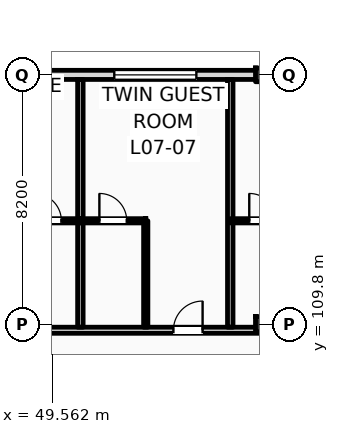
"""IFC4 building model, lengths in metres.
Left out: names, types, materials, properties, quantities, classifications, styles, units other than length and angle.
Written with IfcOpenShell. Run it as: python <this file> out.ifc"""

import sys

from ifc_helpers import new_model, si_unit, direction, frame, frame_2d, origin, origin_2d, place, context, subcontext, project, spatial, rectangle, i_section, extrude, element, fill, save


model = new_model("IFC4")
c1 = context("Model", 3, precision=1e-05, world=origin(), true_north=direction((0.0, 1.0)))
c2 = subcontext(c1, "Body", "Model", "MODEL_VIEW")
j1 = project(units=[si_unit("LENGTHUNIT", "METRE"), si_unit("PLANEANGLEUNIT", "RADIAN")], contexts=[c1])
p1 = place(None, origin())
s1 = spatial("IfcSite", under=j1, at=p1, CompositionType="ELEMENT")
p2 = place(p1, origin())
s2 = spatial("IfcBuilding", under=s1, at=p2, CompositionType="ELEMENT")
p3 = place(p2, frame((0.0, 0.0, 31.8)))
s3 = spatial("IfcBuildingStorey", under=s2, at=p3, CompositionType="ELEMENT", Elevation=31.8)
p4 = place(p3, frame((56.4, 109.8, 0.0), z_axis=(0.0, 0.0, 1.0), x_axis=(1.0, 0.0, 0.0)))
e1 = element("IfcColumn", 1, at=p4, inside=s3, PredefinedType="COLUMN", context=c2, shape_type="SweptSolid", body=[
    extrude(i_section(OverallWidth=0.3, OverallDepth=0.5, WebThickness=0.014, FlangeThickness=0.028, FilletRadius=0.027, at=origin_2d()), origin(), (0.0, 0.0, 1.0), 3.6),
])
p5 = place(p3, frame((56.4, 118.0, 0.0), z_axis=(0.0, 0.0, 1.0), x_axis=(1.0, 0.0, 0.0)))
e2 = element("IfcColumn", 2, at=p5, inside=s3, PredefinedType="COLUMN", context=c2, shape_type="SweptSolid", body=[
    extrude(i_section(OverallWidth=0.3, OverallDepth=0.45, WebThickness=0.014, FlangeThickness=0.026, FilletRadius=0.027, at=origin_2d()), origin(), (0.0, 0.0, 1.0), 3.6),
])
p6 = place(p3, frame((22.5, 118.0, 0.0), z_axis=(0.0, 0.0, 1.0), x_axis=(1.0, 0.0, 0.0)))
e3 = element("IfcWall", 3, at=p6, inside=s3, PredefinedType="STANDARD", context=c2, shape_type="SweptSolid", body=[
    extrude(rectangle(XDim=97.5, YDim=0.3, at=frame_2d((48.75, 0.0))), origin(), (0.0, 0.0, 1.0), 2.72),
])
p7 = place(p6, frame((3.61, 0.0, 0.9)))
e4 = element("IfcOpeningElement", 4, at=p7, cuts=e3, PredefinedType="OPENING", context=c2, shape_type="SweptSolid", body=[
    extrude(rectangle(XDim=1.1, YDim=1.64, at=frame_2d((0.55, 0.82))), frame((0.0, 0.16, 0.0), z_axis=(0.0, -1.0, 0.0), x_axis=(1.0, 0.0, 0.0)), (0.0, 0.0, 1.0), 0.32),
])
p8 = place(p6, frame((6.855, 0.0, 0.0)))
e5 = element("IfcOpeningElement", 5, at=p8, cuts=e3, PredefinedType="OPENING", context=c2, shape_type="SweptSolid", body=[
    extrude(rectangle(XDim=1.2, YDim=2.25, at=frame_2d((0.6, 1.125))), frame((0.0, 0.16, 0.0), z_axis=(0.0, -1.0, 0.0), x_axis=(1.0, 0.0, 0.0)), (0.0, 0.0, 1.0), 0.32),
])
p9 = place(p6, frame((11.405, 0.0, 0.9)))
e6 = element("IfcOpeningElement", 6, at=p9, cuts=e3, PredefinedType="OPENING", context=c2, shape_type="SweptSolid", body=[
    extrude(rectangle(XDim=2.1, YDim=1.64, at=frame_2d((1.05, 0.82))), frame((0.0, 0.16, 0.0), z_axis=(0.0, -1.0, 0.0), x_axis=(1.0, 0.0, 0.0)), (0.0, 0.0, 1.0), 0.32),
])
p10 = place(p6, frame((15.13, 0.0, 0.9)))
e7 = element("IfcOpeningElement", 7, at=p10, cuts=e3, PredefinedType="OPENING", context=c2, shape_type="SweptSolid", body=[
    extrude(rectangle(XDim=2.25, YDim=1.64, at=frame_2d((1.125, 0.82))), frame((0.0, 0.16, 0.0), z_axis=(0.0, -1.0, 0.0), x_axis=(1.0, 0.0, 0.0)), (0.0, 0.0, 1.0), 0.32),
])
p11 = place(p6, frame((21.53, 0.0, 0.0)))
e8 = element("IfcOpeningElement", 8, at=p11, cuts=e3, PredefinedType="OPENING", context=c2, shape_type="SweptSolid", body=[
    extrude(rectangle(XDim=1.2, YDim=2.25, at=frame_2d((0.6, 1.125))), frame((0.0, 0.16, 0.0), z_axis=(0.0, -1.0, 0.0), x_axis=(1.0, 0.0, 0.0)), (0.0, 0.0, 1.0), 0.32),
])
p12 = place(p6, frame((24.18, 0.0, 0.9)))
e9 = element("IfcOpeningElement", 9, at=p12, cuts=e3, PredefinedType="OPENING", context=c2, shape_type="SweptSolid", body=[
    extrude(rectangle(XDim=1.1, YDim=1.64, at=frame_2d((0.55, 0.82))), frame((0.0, 0.16, 0.0), z_axis=(0.0, -1.0, 0.0), x_axis=(1.0, 0.0, 0.0)), (0.0, 0.0, 1.0), 0.32),
])
p13 = place(p6, frame((29.105, 0.0, 0.9)))
e10 = element("IfcOpeningElement", 10, at=p13, cuts=e3, PredefinedType="OPENING", context=c2, shape_type="SweptSolid", body=[
    extrude(rectangle(XDim=2.7, YDim=1.64, at=frame_2d((1.35, 0.82))), frame((0.0, 0.16, 0.0), z_axis=(0.0, -1.0, 0.0), x_axis=(1.0, 0.0, 0.0)), (0.0, 0.0, 1.0), 0.32),
])
p14 = place(p6, frame((34.83, 0.0, 0.9)))
e11 = element("IfcOpeningElement", 11, at=p14, cuts=e3, PredefinedType="OPENING", context=c2, shape_type="SweptSolid", body=[
    extrude(rectangle(XDim=1.8, YDim=1.64, at=frame_2d((0.9, 0.82))), frame((0.0, 0.16, 0.0), z_axis=(0.0, -1.0, 0.0), x_axis=(1.0, 0.0, 0.0)), (0.0, 0.0, 1.0), 0.32),
])
p15 = place(p6, frame((38.525, 0.0, 0.0)))
e12 = element("IfcOpeningElement", 12, at=p15, cuts=e3, PredefinedType="OPENING", context=c2, shape_type="SweptSolid", body=[
    extrude(rectangle(XDim=1.2, YDim=2.25, at=frame_2d((0.6, 1.125))), frame((0.0, 0.16, 0.0), z_axis=(0.0, -1.0, 0.0), x_axis=(1.0, 0.0, 0.0)), (0.0, 0.0, 1.0), 0.32),
])
p16 = place(p6, frame((42.73, 0.0, 0.9)))
e13 = element("IfcOpeningElement", 13, at=p16, cuts=e3, PredefinedType="OPENING", context=c2, shape_type="SweptSolid", body=[
    extrude(rectangle(XDim=3.05, YDim=1.64, at=frame_2d((1.525, 0.82))), frame((0.0, 0.16, 0.0), z_axis=(0.0, -1.0, 0.0), x_axis=(1.0, 0.0, 0.0)), (0.0, 0.0, 1.0), 0.32),
])
p17 = place(p6, frame((47.155, 0.0, 0.9)))
e14 = element("IfcOpeningElement", 14, at=p17, cuts=e3, PredefinedType="OPENING", context=c2, shape_type="SweptSolid", body=[
    extrude(rectangle(XDim=1.35, YDim=1.64, at=frame_2d((0.675, 0.82))), frame((0.0, 0.16, 0.0), z_axis=(0.0, -1.0, 0.0), x_axis=(1.0, 0.0, 0.0)), (0.0, 0.0, 1.0), 0.32),
])
p18 = place(p6, frame((53.065, 0.0, 0.0)))
e15 = element("IfcOpeningElement", 15, at=p18, cuts=e3, PredefinedType="OPENING", context=c2, shape_type="SweptSolid", body=[
    extrude(rectangle(XDim=1.2, YDim=2.25, at=frame_2d((0.6, 1.125))), frame((0.0, 0.16, 0.0), z_axis=(0.0, -1.0, 0.0), x_axis=(1.0, 0.0, 0.0)), (0.0, 0.0, 1.0), 0.32),
])
p19 = place(p6, frame((58.2, 0.0, 0.9)))
e16 = element("IfcOpeningElement", 16, at=p19, cuts=e3, PredefinedType="OPENING", context=c2, shape_type="SweptSolid", body=[
    extrude(rectangle(XDim=1.8, YDim=1.64, at=frame_2d((0.9, 0.82))), frame((0.0, 0.16, 0.0), z_axis=(0.0, -1.0, 0.0), x_axis=(1.0, 0.0, 0.0)), (0.0, 0.0, 1.0), 0.32),
])
p20 = place(p6, frame((61.13, 0.0, 0.9)))
e17 = element("IfcOpeningElement", 17, at=p20, cuts=e3, PredefinedType="OPENING", context=c2, shape_type="SweptSolid", body=[
    extrude(rectangle(XDim=3.05, YDim=1.64, at=frame_2d((1.525, 0.82))), frame((0.0, 0.16, 0.0), z_axis=(0.0, -1.0, 0.0), x_axis=(1.0, 0.0, 0.0)), (0.0, 0.0, 1.0), 0.32),
])
p21 = place(p6, frame((67.93, 0.0, 0.0)))
e18 = element("IfcOpeningElement", 18, at=p21, cuts=e3, PredefinedType="OPENING", context=c2, shape_type="SweptSolid", body=[
    extrude(rectangle(XDim=1.2, YDim=2.25, at=frame_2d((0.6, 1.125))), frame((0.0, 0.16, 0.0), z_axis=(0.0, -1.0, 0.0), x_axis=(1.0, 0.0, 0.0)), (0.0, 0.0, 1.0), 0.32),
])
p22 = place(p6, frame((70.39, 0.0, 0.0)))
e19 = element("IfcOpeningElement", 19, at=p22, cuts=e3, PredefinedType="OPENING", context=c2, shape_type="SweptSolid", body=[
    extrude(rectangle(XDim=1.2, YDim=2.25, at=frame_2d((0.6, 1.125))), frame((0.0, 0.16, 0.0), z_axis=(0.0, -1.0, 0.0), x_axis=(1.0, 0.0, 0.0)), (0.0, 0.0, 1.0), 0.32),
])
p23 = place(p6, frame((75.905, 0.0, 0.9)))
e20 = element("IfcOpeningElement", 20, at=p23, cuts=e3, PredefinedType="OPENING", context=c2, shape_type="SweptSolid", body=[
    extrude(rectangle(XDim=1.1, YDim=1.5, at=frame_2d((0.55, 0.75))), frame((0.0, 0.16, 0.0), z_axis=(0.0, -1.0, 0.0), x_axis=(1.0, 0.0, 0.0)), (0.0, 0.0, 1.0), 0.32),
])
p24 = place(p6, frame((81.63, 0.0, 0.9)))
e21 = element("IfcOpeningElement", 21, at=p24, cuts=e3, PredefinedType="OPENING", context=c2, shape_type="SweptSolid", body=[
    extrude(rectangle(XDim=1.1, YDim=1.6, at=frame_2d((0.55, 0.8))), frame((0.0, 0.16, 0.0), z_axis=(0.0, -1.0, 0.0), x_axis=(1.0, 0.0, 0.0)), (0.0, 0.0, 1.0), 0.32),
])
p25 = place(p6, frame((84.955, 0.0, 0.9)))
e22 = element("IfcOpeningElement", 22, at=p25, cuts=e3, PredefinedType="OPENING", context=c2, shape_type="SweptSolid", body=[
    extrude(rectangle(XDim=1.4, YDim=1.64, at=frame_2d((0.7, 0.82))), frame((0.0, 0.16, 0.0), z_axis=(0.0, -1.0, 0.0), x_axis=(1.0, 0.0, 0.0)), (0.0, 0.0, 1.0), 0.32),
])
p26 = place(p6, frame((90.055, 0.0, 0.9)))
e23 = element("IfcOpeningElement", 23, at=p26, cuts=e3, PredefinedType="OPENING", context=c2, shape_type="SweptSolid", body=[
    extrude(rectangle(XDim=1.6, YDim=1.64, at=frame_2d((0.8, 0.82))), frame((0.0, 0.16, 0.0), z_axis=(0.0, -1.0, 0.0), x_axis=(1.0, 0.0, 0.0)), (0.0, 0.0, 1.0), 0.32),
])
p27 = place(p6, frame((93.87, 0.0, 0.9)))
e24 = element("IfcOpeningElement", 24, at=p27, cuts=e3, PredefinedType="OPENING", context=c2, shape_type="SweptSolid", body=[
    extrude(rectangle(XDim=1.75, YDim=1.64, at=frame_2d((0.875, 0.82))), frame((0.0, 0.16, 0.0), z_axis=(0.0, -1.0, 0.0), x_axis=(1.0, 0.0, 0.0)), (0.0, 0.0, 1.0), 0.32),
])
p28 = place(p3, frame((10.65, 109.6, 0.0), z_axis=(0.0, 0.0, 1.0), x_axis=(1.0, 0.0, 0.0)))
e25 = element("IfcWall", 25, at=p28, inside=s3, PredefinedType="PARTITIONING", context=c2, shape_type="SweptSolid", body=[
    extrude(rectangle(XDim=109.21, YDim=0.2, at=frame_2d((54.605, 0.0))), origin(), (0.0, 0.0, 1.0), 2.72),
])
p29 = place(p28, frame((15.825, 0.0, 0.0)))
e26 = element("IfcOpeningElement", 26, at=p29, cuts=e25, PredefinedType="OPENING", context=c2, shape_type="SweptSolid", body=[
    extrude(rectangle(XDim=1.02, YDim=2.2, at=frame_2d((0.51, 1.1))), frame((0.0, 0.11, 0.0), z_axis=(0.0, -1.0, 0.0), x_axis=(1.0, 0.0, 0.0)), (0.0, 0.0, 1.0), 0.22),
])
p30 = place(p28, frame((19.87, 0.0, 0.0)))
e27 = element("IfcOpeningElement", 27, at=p30, cuts=e25, PredefinedType="OPENING", context=c2, shape_type="SweptSolid", body=[
    extrude(rectangle(XDim=1.02, YDim=2.2, at=frame_2d((0.51, 1.1))), frame((0.0, 0.11, 0.0), z_axis=(0.0, -1.0, 0.0), x_axis=(1.0, 0.0, 0.0)), (0.0, 0.0, 1.0), 0.22),
])
p31 = place(p28, frame((24.47, 0.0, 0.0)))
e28 = element("IfcOpeningElement", 28, at=p31, cuts=e25, PredefinedType="OPENING", context=c2, shape_type="SweptSolid", body=[
    extrude(rectangle(XDim=1.02, YDim=2.2, at=frame_2d((0.51, 1.1))), frame((0.0, 0.11, 0.0), z_axis=(0.0, -1.0, 0.0), x_axis=(1.0, 0.0, 0.0)), (0.0, 0.0, 1.0), 0.22),
])
p32 = place(p28, frame((26.92, 0.0, 0.0)))
e29 = element("IfcOpeningElement", 29, at=p32, cuts=e25, PredefinedType="OPENING", context=c2, shape_type="SweptSolid", body=[
    extrude(rectangle(XDim=1.02, YDim=2.2, at=frame_2d((0.51, 1.1))), frame((0.0, 0.11, 0.0), z_axis=(0.0, -1.0, 0.0), x_axis=(1.0, 0.0, 0.0)), (0.0, 0.0, 1.0), 0.22),
])
p33 = place(p28, frame((33.7, 0.0, 0.0)))
e30 = element("IfcOpeningElement", 30, at=p33, cuts=e25, PredefinedType="OPENING", context=c2, shape_type="SweptSolid", body=[
    extrude(rectangle(XDim=0.96, YDim=2.2, at=frame_2d((0.48, 1.1))), frame((0.0, 0.11, 0.0), z_axis=(0.0, -1.0, 0.0), x_axis=(1.0, 0.0, 0.0)), (0.0, 0.0, 1.0), 0.22),
])
p34 = place(p28, frame((35.9, 0.0, 0.0)))
e31 = element("IfcOpeningElement", 31, at=p34, cuts=e25, PredefinedType="OPENING", context=c2, shape_type="SweptSolid", body=[
    extrude(rectangle(XDim=0.96, YDim=2.2, at=frame_2d((0.48, 1.1))), frame((0.0, 0.11, 0.0), z_axis=(0.0, -1.0, 0.0), x_axis=(1.0, 0.0, 0.0)), (0.0, 0.0, 1.0), 0.22),
])
p35 = place(p28, frame((42.9, 0.0, 0.0)))
e32 = element("IfcOpeningElement", 32, at=p35, cuts=e25, PredefinedType="OPENING", context=c2, shape_type="SweptSolid", body=[
    extrude(rectangle(XDim=0.96, YDim=2.2, at=frame_2d((0.48, 1.1))), frame((0.0, 0.11, 0.0), z_axis=(0.0, -1.0, 0.0), x_axis=(1.0, 0.0, 0.0)), (0.0, 0.0, 1.0), 0.22),
])
p36 = place(p28, frame((47.5, 0.0, 0.0)))
e33 = element("IfcOpeningElement", 33, at=p36, cuts=e25, PredefinedType="OPENING", context=c2, shape_type="SweptSolid", body=[
    extrude(rectangle(XDim=0.96, YDim=2.2, at=frame_2d((0.48, 1.1))), frame((0.0, 0.11, 0.0), z_axis=(0.0, -1.0, 0.0), x_axis=(1.0, 0.0, 0.0)), (0.0, 0.0, 1.0), 0.22),
])
p37 = place(p28, frame((49.95, 0.0, 0.0)))
e34 = element("IfcOpeningElement", 34, at=p37, cuts=e25, PredefinedType="OPENING", context=c2, shape_type="SweptSolid", body=[
    extrude(rectangle(XDim=0.96, YDim=2.2, at=frame_2d((0.48, 1.1))), frame((0.0, 0.11, 0.0), z_axis=(0.0, -1.0, 0.0), x_axis=(1.0, 0.0, 0.0)), (0.0, 0.0, 1.0), 0.22),
])
p38 = place(p28, frame((56.7, 0.0, 0.0)))
e35 = element("IfcOpeningElement", 35, at=p38, cuts=e25, PredefinedType="OPENING", context=c2, shape_type="SweptSolid", body=[
    extrude(rectangle(XDim=0.96, YDim=2.2, at=frame_2d((0.48, 1.1))), frame((0.0, 0.11, 0.0), z_axis=(0.0, -1.0, 0.0), x_axis=(1.0, 0.0, 0.0)), (0.0, 0.0, 1.0), 0.22),
])
p39 = place(p28, frame((59.15, 0.0, 0.0)))
e36 = element("IfcOpeningElement", 36, at=p39, cuts=e25, PredefinedType="OPENING", context=c2, shape_type="SweptSolid", body=[
    extrude(rectangle(XDim=0.96, YDim=2.2, at=frame_2d((0.48, 1.1))), frame((0.0, 0.11, 0.0), z_axis=(0.0, -1.0, 0.0), x_axis=(1.0, 0.0, 0.0)), (0.0, 0.0, 1.0), 0.22),
])
p40 = place(p28, frame((65.9, 0.0, 0.0)))
e37 = element("IfcOpeningElement", 37, at=p40, cuts=e25, PredefinedType="OPENING", context=c2, shape_type="SweptSolid", body=[
    extrude(rectangle(XDim=0.96, YDim=2.2, at=frame_2d((0.48, 1.1))), frame((0.0, 0.11, 0.0), z_axis=(0.0, -1.0, 0.0), x_axis=(1.0, 0.0, 0.0)), (0.0, 0.0, 1.0), 0.22),
])
p41 = place(p28, frame((70.5, 0.0, 0.0)))
e38 = element("IfcOpeningElement", 38, at=p41, cuts=e25, PredefinedType="OPENING", context=c2, shape_type="SweptSolid", body=[
    extrude(rectangle(XDim=0.96, YDim=2.2, at=frame_2d((0.48, 1.1))), frame((0.0, 0.11, 0.0), z_axis=(0.0, -1.0, 0.0), x_axis=(1.0, 0.0, 0.0)), (0.0, 0.0, 1.0), 0.22),
])
p42 = place(p28, frame((72.95, 0.0, 0.0)))
e39 = element("IfcOpeningElement", 39, at=p42, cuts=e25, PredefinedType="OPENING", context=c2, shape_type="SweptSolid", body=[
    extrude(rectangle(XDim=0.96, YDim=2.2, at=frame_2d((0.48, 1.1))), frame((0.0, 0.11, 0.0), z_axis=(0.0, -1.0, 0.0), x_axis=(1.0, 0.0, 0.0)), (0.0, 0.0, 1.0), 0.22),
])
p43 = place(p28, frame((79.7, 0.0, 0.0)))
e40 = element("IfcOpeningElement", 40, at=p43, cuts=e25, PredefinedType="OPENING", context=c2, shape_type="SweptSolid", body=[
    extrude(rectangle(XDim=0.96, YDim=2.2, at=frame_2d((0.48, 1.1))), frame((0.0, 0.11, 0.0), z_axis=(0.0, -1.0, 0.0), x_axis=(1.0, 0.0, 0.0)), (0.0, 0.0, 1.0), 0.22),
])
p44 = place(p28, frame((82.15, 0.0, 0.0)))
e41 = element("IfcOpeningElement", 41, at=p44, cuts=e25, PredefinedType="OPENING", context=c2, shape_type="SweptSolid", body=[
    extrude(rectangle(XDim=0.96, YDim=2.2, at=frame_2d((0.48, 1.1))), frame((0.0, 0.11, 0.0), z_axis=(0.0, -1.0, 0.0), x_axis=(1.0, 0.0, 0.0)), (0.0, 0.0, 1.0), 0.22),
])
p45 = place(p28, frame((88.9, 0.0, 0.0)))
e42 = element("IfcOpeningElement", 42, at=p45, cuts=e25, PredefinedType="OPENING", context=c2, shape_type="SweptSolid", body=[
    extrude(rectangle(XDim=0.96, YDim=2.2, at=frame_2d((0.48, 1.1))), frame((0.0, 0.11, 0.0), z_axis=(0.0, -1.0, 0.0), x_axis=(1.0, 0.0, 0.0)), (0.0, 0.0, 1.0), 0.22),
])
p46 = place(p28, frame((93.75, 0.0, 0.0)))
e43 = element("IfcOpeningElement", 43, at=p46, cuts=e25, PredefinedType="OPENING", context=c2, shape_type="SweptSolid", body=[
    extrude(rectangle(XDim=0.96, YDim=2.2, at=frame_2d((0.48, 1.1))), frame((0.0, 0.11, 0.0), z_axis=(0.0, -1.0, 0.0), x_axis=(1.0, 0.0, 0.0)), (0.0, 0.0, 1.0), 0.22),
])
p47 = place(p28, frame((98.1, 0.0, 0.0)))
e44 = element("IfcOpeningElement", 44, at=p47, cuts=e25, PredefinedType="OPENING", context=c2, shape_type="SweptSolid", body=[
    extrude(rectangle(XDim=0.96, YDim=2.2, at=frame_2d((0.48, 1.1))), frame((0.0, 0.11, 0.0), z_axis=(0.0, -1.0, 0.0), x_axis=(1.0, 0.0, 0.0)), (0.0, 0.0, 1.0), 0.22),
])
p48 = place(p28, frame((102.7, 0.0, 0.0)))
e45 = element("IfcOpeningElement", 45, at=p48, cuts=e25, PredefinedType="OPENING", context=c2, shape_type="SweptSolid", body=[
    extrude(rectangle(XDim=0.96, YDim=2.2, at=frame_2d((0.48, 1.1))), frame((0.0, 0.11, 0.0), z_axis=(0.0, -1.0, 0.0), x_axis=(1.0, 0.0, 0.0)), (0.0, 0.0, 1.0), 0.22),
])
p49 = place(p28, frame((105.04, 0.0, 0.0)))
e46 = element("IfcOpeningElement", 46, at=p49, cuts=e25, PredefinedType="OPENING", context=c2, shape_type="SweptSolid", body=[
    extrude(rectangle(XDim=0.96, YDim=2.2, at=frame_2d((0.48, 1.1))), frame((0.0, 0.11, 0.0), z_axis=(0.0, -1.0, 0.0), x_axis=(1.0, 0.0, 0.0)), (0.0, 0.0, 1.0), 0.22),
])
p50 = place(p28, frame((2.716, 0.0, 0.0)))
e47 = element("IfcOpeningElement", 47, at=p50, cuts=e25, PredefinedType="OPENING", context=c2, shape_type="SweptSolid", body=[
    extrude(rectangle(XDim=1.35, YDim=2.25, at=frame_2d((0.675, 1.125))), frame((0.0, 0.11, 0.0), z_axis=(0.0, -1.0, 0.0), x_axis=(1.0, 0.0, 0.0)), (0.0, 0.0, 1.0), 0.22),
])
p51 = place(p28, frame((6.65, 0.0, 0.0)))
e48 = element("IfcOpeningElement", 48, at=p51, cuts=e25, PredefinedType="OPENING", context=c2, shape_type="SweptSolid", body=[
    extrude(rectangle(XDim=1.35, YDim=2.25, at=frame_2d((0.675, 1.125))), frame((0.0, 0.11, 0.0), z_axis=(0.0, -1.0, 0.0), x_axis=(1.0, 0.0, 0.0)), (0.0, 0.0, 1.0), 0.22),
])
p52 = place(p28, frame((10.583, 0.0, 0.0)))
e49 = element("IfcOpeningElement", 49, at=p52, cuts=e25, PredefinedType="OPENING", context=c2, shape_type="SweptSolid", body=[
    extrude(rectangle(XDim=1.35, YDim=2.25, at=frame_2d((0.675, 1.125))), frame((0.0, 0.11, 0.0), z_axis=(0.0, -1.0, 0.0), x_axis=(1.0, 0.0, 0.0)), (0.0, 0.0, 1.0), 0.22),
])
p53 = place(p3, frame((50.49, 109.7, 0.0), z_axis=(0.0, 0.0, 1.0), x_axis=(0.0, 1.0, 0.0)))
e50 = element("IfcWall", 50, at=p53, inside=s3, PredefinedType="PARTITIONING", context=c2, shape_type="SweptSolid", body=[
    extrude(rectangle(XDim=8.15, YDim=0.18, at=frame_2d((4.075, 0.0))), origin(), (0.0, 0.0, 1.0), 3.36),
])
p54 = place(p3, frame((48.34, 113.2, 0.0), z_axis=(0.0, 0.0, 1.0), x_axis=(1.0, 0.0, 0.0)))
e51 = element("IfcWall", 51, at=p54, inside=s3, PredefinedType="PARTITIONING", context=c2, shape_type="SweptSolid", body=[
    extrude(rectangle(XDim=2.15, YDim=0.14, at=frame_2d((1.075, 0.0))), origin(), (0.0, 0.0, 1.0), 3.36),
])
p55 = place(p54, frame((0.625, 0.0, 0.0)))
e52 = element("IfcOpeningElement", 52, at=p55, cuts=e51, PredefinedType="OPENING", context=c2, shape_type="SweptSolid", body=[
    extrude(rectangle(XDim=0.9, YDim=2.1, at=frame_2d((0.45, 1.05))), frame((0.0, 0.08, 0.0), z_axis=(0.0, -1.0, 0.0), x_axis=(1.0, 0.0, 0.0)), (0.0, 0.0, 1.0), 0.16),
])
p56 = place(p3, frame((55.42, 109.7, 0.0), z_axis=(0.0, 0.0, 1.0), x_axis=(0.0, 1.0, 0.0)))
e53 = element("IfcWall", 53, at=p56, inside=s3, PredefinedType="PARTITIONING", context=c2, shape_type="SweptSolid", body=[
    extrude(rectangle(XDim=8.15, YDim=0.18, at=frame_2d((4.075, 0.0))), origin(), (0.0, 0.0, 1.0), 3.36),
])
p57 = place(p3, frame((52.64, 109.7, 0.0), z_axis=(0.0, 0.0, 1.0), x_axis=(0.0, 1.0, 0.0)))
e54 = element("IfcWall", 54, at=p57, inside=s3, PredefinedType="PARTITIONING", context=c2, shape_type="SweptSolid", body=[
    extrude(rectangle(XDim=3.5, YDim=0.14, at=frame_2d((1.75, 0.0))), origin(), (0.0, 0.0, 1.0), 3.36),
])
p58 = place(p3, frame((50.49, 113.2, 0.0), z_axis=(0.0, 0.0, 1.0), x_axis=(1.0, 0.0, 0.0)))
e55 = element("IfcWall", 55, at=p58, inside=s3, PredefinedType="PARTITIONING", context=c2, shape_type="SweptSolid", body=[
    extrude(rectangle(XDim=2.15, YDim=0.14, at=frame_2d((1.075, 0.0))), origin(), (0.0, 0.0, 1.0), 3.36),
])
p59 = place(p58, frame((0.625, 0.0, 0.0)))
e56 = element("IfcOpeningElement", 56, at=p59, cuts=e55, PredefinedType="OPENING", context=c2, shape_type="SweptSolid", body=[
    extrude(rectangle(XDim=0.9, YDim=2.1, at=frame_2d((0.45, 1.05))), frame((0.0, 0.08, 0.0), z_axis=(0.0, -1.0, 0.0), x_axis=(1.0, 0.0, 0.0)), (0.0, 0.0, 1.0), 0.16),
])
p60 = place(p3, frame((55.42, 113.2, 0.0), z_axis=(0.0, 0.0, 1.0), x_axis=(1.0, 0.0, 0.0)))
e57 = element("IfcWall", 57, at=p60, inside=s3, PredefinedType="PARTITIONING", context=c2, shape_type="SweptSolid", body=[
    extrude(rectangle(XDim=2.15, YDim=0.14, at=frame_2d((1.075, 0.0))), origin(), (0.0, 0.0, 1.0), 3.36),
])
p61 = place(p60, frame((0.625, 0.0, 0.0)))
e58 = element("IfcOpeningElement", 58, at=p61, cuts=e57, PredefinedType="OPENING", context=c2, shape_type="SweptSolid", body=[
    extrude(rectangle(XDim=0.9, YDim=2.1, at=frame_2d((0.45, 1.05))), frame((0.0, 0.08, 0.0), z_axis=(0.0, -1.0, 0.0), x_axis=(1.0, 0.0, 0.0)), (0.0, 0.0, 1.0), 0.16),
])
p62 = place(p13, origin())
e59 = element("IfcWindow", 59, at=p62, inside=s3, PartitioningType="DOUBLE_PANEL_VERTICAL", PredefinedType="WINDOW", context=c2, shape_type="SweptSolid", body=[
    extrude(rectangle(XDim=2.7, YDim=1.64, at=frame_2d((1.35, 0.82))), frame((0.0, 0.03, 0.0), z_axis=(0.0, -1.0, 0.0), x_axis=(1.0, 0.0, 0.0)), (0.0, 0.0, 1.0), 0.06),
])
fill(e10, e59)
p63 = place(p55, origin())
e60 = element("IfcDoor", 60, at=p63, inside=s3, OperationType="SINGLE_SWING_LEFT", PredefinedType="DOOR", context=c2, shape_type="SweptSolid", body=[
    extrude(rectangle(XDim=0.9, YDim=2.1, at=frame_2d((0.45, 1.05))), frame((0.0, 0.025, 0.0), z_axis=(0.0, -1.0, 0.0), x_axis=(1.0, 0.0, 0.0)), (0.0, 0.0, 1.0), 0.05),
])
fill(e52, e60)
p64 = place(p35, origin())
e61 = element("IfcDoor", 61, at=p64, inside=s3, OperationType="SINGLE_SWING_RIGHT", PredefinedType="DOOR", context=c2, shape_type="SweptSolid", body=[
    extrude(rectangle(XDim=0.96, YDim=2.2, at=frame_2d((0.48, 1.1))), frame((0.0, 0.025, 0.0), z_axis=(0.0, -1.0, 0.0), x_axis=(1.0, 0.0, 0.0)), (0.0, 0.0, 1.0), 0.05),
])
fill(e32, e61)
p65 = place(p59, origin())
e62 = element("IfcDoor", 62, at=p65, inside=s3, OperationType="SINGLE_SWING_LEFT", PredefinedType="DOOR", context=c2, shape_type="SweptSolid", body=[
    extrude(rectangle(XDim=0.9, YDim=2.1, at=frame_2d((0.45, 1.05))), frame((0.0, 0.025, 0.0), z_axis=(0.0, -1.0, 0.0), x_axis=(1.0, 0.0, 0.0)), (0.0, 0.0, 1.0), 0.05),
])
fill(e56, e62)
p66 = place(p61, origin())
e63 = element("IfcDoor", 63, at=p66, inside=s3, OperationType="SINGLE_SWING_LEFT", PredefinedType="DOOR", context=c2, shape_type="SweptSolid", body=[
    extrude(rectangle(XDim=0.9, YDim=2.1, at=frame_2d((0.45, 1.05))), frame((0.0, 0.025, 0.0), z_axis=(0.0, -1.0, 0.0), x_axis=(1.0, 0.0, 0.0)), (0.0, 0.0, 1.0), 0.05),
])
fill(e58, e63)
save(model, sys.argv[1])
